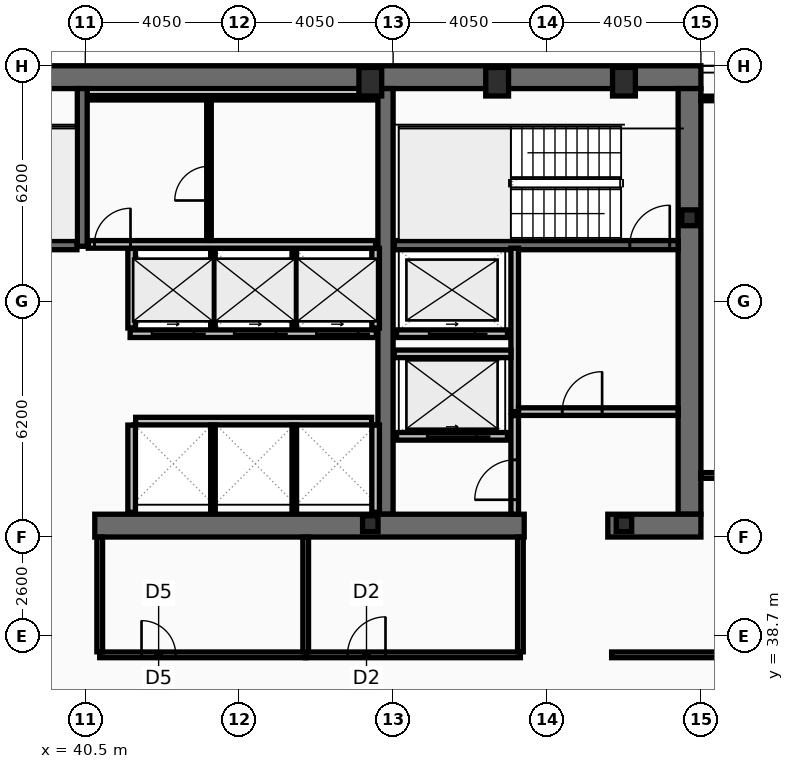
"""IFC4 building model, lengths in metres.
Left out: names, types, materials, properties, quantities, classifications, styles, units other than length and angle.
Written with IfcOpenShell. Run it as: python <this file> out.ifc"""

import sys

from ifc_helpers import new_model, si_unit, direction, frame, frame_2d, origin, origin_2d, place, context, subcontext, project, spatial, rectangle, hollow_rectangle, i_section, extrude, element, fill, save


model = new_model("IFC4")
c1 = context("Model", 3, precision=1e-05, world=origin(), true_north=direction((0.0, 1.0)))
c2 = subcontext(c1, "Body", "Model", "MODEL_VIEW")
j1 = project(units=[si_unit("LENGTHUNIT", "METRE"), si_unit("PLANEANGLEUNIT", "RADIAN")], contexts=[c1])
p1 = place(None, origin())
s1 = spatial("IfcSite", under=j1, at=p1, CompositionType="ELEMENT")
p2 = place(p1, origin())
s2 = spatial("IfcBuilding", under=s1, at=p2, CompositionType="ELEMENT")
p3 = place(p2, frame((0.0, 0.0, 246.2)))
s3 = spatial("IfcBuildingStorey", under=s2, at=p3, CompositionType="ELEMENT", Elevation=246.2)
p4 = place(p3, frame((16.2, 53.4, 0.0), z_axis=(0.0, 0.0, 1.0), x_axis=(1.0, 0.0, 0.0)))
e1 = element("IfcWall", 1, at=p4, inside=s3, PredefinedType="SHEAR", context=c2, shape_type="SweptSolid", body=[
    extrude(rectangle(XDim=40.5, YDim=0.6, at=frame_2d((20.25, 0.0))), origin(), (0.0, 0.0, 1.0), 3.44),
])
p5 = place(p3, frame((56.4, 53.1, 0.0), z_axis=(0.0, 0.0, 1.0), x_axis=(0.0, -1.0, 0.0)))
e2 = element("IfcWall", 2, at=p5, inside=s3, PredefinedType="SHEAR", context=c2, shape_type="SweptSolid", body=[
    extrude(rectangle(XDim=11.2, YDim=0.6, at=frame_2d((5.6, 0.0))), origin(), (0.0, 0.0, 1.0), 3.44),
])
p6 = place(p3, frame((48.4, 41.9, 0.0), z_axis=(0.0, 0.0, 1.0), x_axis=(0.0, 1.0, 0.0)))
e3 = element("IfcWall", 3, at=p6, inside=s3, PredefinedType="SHEAR", context=c2, shape_type="SweptSolid", body=[
    extrude(rectangle(XDim=11.2, YDim=0.4, at=frame_2d((5.6, 0.0))), origin(), (0.0, 0.0, 1.0), 3.44),
])
p7 = place(p3, frame((52.05, 41.6, 0.0), z_axis=(0.0, 0.0, 1.0), x_axis=(-1.0, 0.0, 0.0)))
e4 = element("IfcWall", 4, at=p7, inside=s3, PredefinedType="SHEAR", context=c2, shape_type="SweptSolid", body=[
    extrude(rectangle(XDim=11.3, YDim=0.6, at=frame_2d((5.65, 0.0))), origin(), (0.0, 0.0, 1.0), 3.44),
])
p8 = place(p3, frame((56.7, 41.6, 0.0), z_axis=(0.0, 0.0, 1.0), x_axis=(-1.0, 0.0, 0.0)))
e5 = element("IfcWall", 5, at=p8, inside=s3, PredefinedType="SHEAR", context=c2, shape_type="SweptSolid", body=[
    extrude(rectangle(XDim=2.45, YDim=0.6, at=frame_2d((1.225, 0.0))), origin(), (0.0, 0.0, 1.0), 3.44),
])
p9 = place(p3, frame((40.42, 48.95, 0.0), z_axis=(0.0, 0.0, 1.0), x_axis=(0.0, 1.0, 0.0)))
e6 = element("IfcWall", 6, at=p9, inside=s3, PredefinedType="SHEAR", context=c2, shape_type="SweptSolid", body=[
    extrude(rectangle(XDim=4.15, YDim=0.26, at=frame_2d((2.075, 0.0))), origin(), (0.0, 0.0, 1.0), 3.44),
])
p10 = place(p3, frame((48.63, 48.98, 0.0), z_axis=(0.0, 0.0, 1.0), x_axis=(1.0, 0.0, 0.0)))
e7 = element("IfcWall", 7, at=p10, inside=s3, PredefinedType="SHEAR", context=c2, shape_type="SweptSolid", body=[
    extrude(rectangle(XDim=7.47, YDim=0.24, at=frame_2d((3.735, 0.0))), origin(), (0.0, 0.0, 1.0), 3.44),
])
p11 = place(p10, frame((6.2, 0.0, 0.0)))
e8 = element("IfcOpeningElement", 8, at=p11, cuts=e7, PredefinedType="OPENING", context=c2, shape_type="SweptSolid", body=[
    extrude(rectangle(XDim=1.05, YDim=2.15, at=frame_2d((0.525, 1.075))), frame((0.0, 0.13, 0.0), z_axis=(0.0, -1.0, 0.0), x_axis=(1.0, 0.0, 0.0)), (0.0, 0.0, 1.0), 0.26),
])
p12 = place(p3, frame((32.72, 48.98, 0.0), z_axis=(0.0, 0.0, 1.0), x_axis=(1.0, 0.0, 0.0)))
e9 = element("IfcWall", 9, at=p12, inside=s3, PredefinedType="SHEAR", context=c2, shape_type="SweptSolid", body=[
    extrude(rectangle(XDim=7.56, YDim=0.24, at=frame_2d((3.78, 0.0))), origin(), (0.0, 0.0, 1.0), 3.44),
])
p13 = place(p12, frame((0.22, 0.0, 0.0)))
e10 = element("IfcOpeningElement", 10, at=p13, cuts=e9, PredefinedType="OPENING", context=c2, shape_type="SweptSolid", body=[
    extrude(rectangle(XDim=1.05, YDim=2.15, at=frame_2d((0.525, 1.075))), frame((0.0, 0.13, 0.0), z_axis=(0.0, -1.0, 0.0), x_axis=(1.0, 0.0, 0.0)), (0.0, 0.0, 1.0), 0.26),
])
for number, where, z_axis, x_axis in (
    (11, (48.0, 53.28, 0.0), (0.0, 0.0, 1.0), (1.0, 0.0, 0.0)),
    (12, (51.337, 53.28, 0.0), (0.0, 0.0, 1.0), (1.0, 0.0, 0.0)),
    (13, (54.675, 53.28, 0.0), (0.0, 0.0, 1.0), (1.0, 0.0, 0.0)),
):
    element("IfcColumn", number, at=place(p3, frame(where, z_axis=z_axis, x_axis=x_axis)), inside=s3, PredefinedType="COLUMN", context=c2, shape_type="SweptSolid", body=[
        extrude(hollow_rectangle(XDim=0.6, YDim=0.75, WallThickness=0.045, at=origin_2d()), origin(), (0.0, 0.0, 1.0), 3.6),
    ])
for number, where, z_axis, x_axis in (
    (14, (56.4, 49.7, 0.0), (0.0, 0.0, 1.0), (1.0, 0.0, 0.0)),
    (15, (48.0, 41.65, 0.0), (0.0, 0.0, 1.0), (1.0, 0.0, 0.0)),
    (16, (54.675, 41.65, 0.0), (0.0, 0.0, 1.0), (1.0, 0.0, 0.0)),
):
    element("IfcColumn", number, at=place(p3, frame(where, z_axis=z_axis, x_axis=x_axis)), inside=s3, PredefinedType="COLUMN", context=c2, shape_type="SweptSolid", body=[
        extrude(i_section(OverallWidth=0.406, OverallDepth=0.416, WebThickness=0.03, FlangeThickness=0.048, at=origin_2d()), origin(), (0.0, 0.0, 1.0), 3.6),
    ])
p14 = place(p3, frame((51.61, 43.95, 0.0), z_axis=(0.0, 0.0, 1.0), x_axis=(-1.0, 0.0, 0.0)))
e17 = element("IfcWall", 17, at=p14, inside=s3, PredefinedType="PARTITIONING", context=c2, shape_type="SweptSolid", body=[
    extrude(rectangle(XDim=2.92, YDim=0.2, at=frame_2d((1.46, 0.0))), origin(), (0.0, 0.0, 1.0), 3.44),
])
p15 = place(p14, frame((0.81, 0.0, 0.0)))
e18 = element("IfcOpeningElement", 18, at=p15, cuts=e17, PredefinedType="OPENING", context=c2, shape_type="SweptSolid", body=[
    extrude(rectangle(XDim=1.3, YDim=2.18, at=frame_2d((0.65, 1.09))), frame((0.0, 0.11, 0.0), z_axis=(0.0, -1.0, 0.0), x_axis=(1.0, 0.0, 0.0)), (0.0, 0.0, 1.0), 0.22),
])
p16 = place(p3, frame((51.61, 46.65, 0.0), z_axis=(0.0, 0.0, 1.0), x_axis=(-1.0, 0.0, 0.0)))
e19 = element("IfcWall", 19, at=p16, inside=s3, PredefinedType="PARTITIONING", context=c2, shape_type="SweptSolid", body=[
    extrude(rectangle(XDim=2.92, YDim=0.2, at=frame_2d((1.46, 0.0))), origin(), (0.0, 0.0, 1.0), 3.44),
])
p17 = place(p16, frame((0.86, 0.0, 0.0)))
e20 = element("IfcOpeningElement", 20, at=p17, cuts=e19, PredefinedType="OPENING", context=c2, shape_type="SweptSolid", body=[
    extrude(rectangle(XDim=1.2, YDim=2.18, at=frame_2d((0.6, 1.09))), frame((0.0, 0.11, 0.0), z_axis=(0.0, -1.0, 0.0), x_axis=(1.0, 0.0, 0.0)), (0.0, 0.0, 1.0), 0.22),
])
p18 = place(p3, frame((48.16, 46.65, 0.0), z_axis=(0.0, 0.0, 1.0), x_axis=(-1.0, 0.0, 0.0)))
e21 = element("IfcWall", 21, at=p18, inside=s3, PredefinedType="PARTITIONING", context=c2, shape_type="SweptSolid", body=[
    extrude(rectangle(XDim=6.48, YDim=0.2, at=frame_2d((3.24, 0.0))), origin(), (0.0, 0.0, 1.0), 3.44),
])
p19 = place(p18, frame((4.8, 0.0, 0.0)))
e22 = element("IfcOpeningElement", 22, at=p19, cuts=e21, PredefinedType="OPENING", context=c2, shape_type="SweptSolid", body=[
    extrude(rectangle(XDim=1.1, YDim=2.18, at=frame_2d((0.55, 1.09))), frame((0.0, 0.11, 0.0), z_axis=(0.0, -1.0, 0.0), x_axis=(1.0, 0.0, 0.0)), (0.0, 0.0, 1.0), 0.22),
])
p20 = place(p18, frame((2.64, 0.0, 0.0)))
e23 = element("IfcOpeningElement", 23, at=p20, cuts=e21, PredefinedType="OPENING", context=c2, shape_type="SweptSolid", body=[
    extrude(rectangle(XDim=1.1, YDim=2.18, at=frame_2d((0.55, 1.09))), frame((0.0, 0.11, 0.0), z_axis=(0.0, -1.0, 0.0), x_axis=(1.0, 0.0, 0.0)), (0.0, 0.0, 1.0), 0.22),
])
p21 = place(p18, frame((0.48, 0.0, 0.0)))
e24 = element("IfcOpeningElement", 24, at=p21, cuts=e21, PredefinedType="OPENING", context=c2, shape_type="SweptSolid", body=[
    extrude(rectangle(XDim=1.1, YDim=2.18, at=frame_2d((0.55, 1.09))), frame((0.0, 0.11, 0.0), z_axis=(0.0, -1.0, 0.0), x_axis=(1.0, 0.0, 0.0)), (0.0, 0.0, 1.0), 0.22),
])
p22 = place(p3, frame((51.8, 44.6, 0.0), z_axis=(0.0, 0.0, 1.0), x_axis=(0.0, 1.0, 0.0)))
e25 = element("IfcWall", 25, at=p22, inside=s3, PredefinedType="PARTITIONING", context=c2, shape_type="SweptSolid", body=[
    extrude(rectangle(XDim=4.3, YDim=0.2, at=frame_2d((2.15, 0.0))), origin(), (0.0, 0.0, 1.0), 3.44),
])
p23 = place(p3, frame((51.9, 44.6, 0.0), z_axis=(0.0, 0.0, 1.0), x_axis=(1.0, 0.0, 0.0)))
e26 = element("IfcWall", 26, at=p23, inside=s3, PredefinedType="PARTITIONING", context=c2, shape_type="SweptSolid", body=[
    extrude(rectangle(XDim=4.2, YDim=0.2, at=frame_2d((2.1, 0.0))), origin(), (0.0, 0.0, 1.0), 3.44),
])
p24 = place(p23, frame((1.15, 0.0, 0.0)))
e27 = element("IfcOpeningElement", 27, at=p24, cuts=e26, PredefinedType="OPENING", context=c2, shape_type="SweptSolid", body=[
    extrude(rectangle(XDim=1.05, YDim=2.15, at=frame_2d((0.525, 1.075))), frame((0.0, 0.11, 0.0), z_axis=(0.0, -1.0, 0.0), x_axis=(1.0, 0.0, 0.0)), (0.0, 0.0, 1.0), 0.22),
])
p25 = place(p3, frame((48.63, 46.12, 0.0), z_axis=(0.0, 0.0, 1.0), x_axis=(1.0, 0.0, 0.0)))
e28 = element("IfcWall", 28, at=p25, inside=s3, PredefinedType="PARTITIONING", context=c2, shape_type="SweptSolid", body=[
    extrude(rectangle(XDim=3.07, YDim=0.2, at=frame_2d((1.535, 0.0))), origin(), (0.0, 0.0, 1.0), 3.44),
])
p26 = place(p3, frame((51.8, 41.9, 0.0), z_axis=(0.0, 0.0, 1.0), x_axis=(0.0, 1.0, 0.0)))
e29 = element("IfcWall", 29, at=p26, inside=s3, PredefinedType="PARTITIONING", context=c2, shape_type="SweptSolid", body=[
    extrude(rectangle(XDim=2.595, YDim=0.2, at=frame_2d((1.298, 0.0))), origin(), (0.0, 0.0, 1.0), 3.44),
])
p27 = place(p26, frame((0.38, 0.0, 0.0)))
e30 = element("IfcOpeningElement", 30, at=p27, cuts=e29, PredefinedType="OPENING", context=c2, shape_type="SweptSolid", body=[
    extrude(rectangle(XDim=1.05, YDim=2.15, at=frame_2d((0.525, 1.075))), frame((0.0, 0.11, 0.0), z_axis=(0.0, -1.0, 0.0), x_axis=(1.0, 0.0, 0.0)), (0.0, 0.0, 1.0), 0.22),
])
for number, where, z_axis, x_axis in (
    (31, (41.72, 46.8, 0.0), (0.0, 0.0, 1.0), (0.0, 1.0, 0.0)),
    (32, (48.14, 46.8, 0.0), (0.0, 0.0, 1.0), (0.0, 1.0, 0.0)),
):
    element("IfcWall", number, at=place(p3, frame(where, z_axis=z_axis, x_axis=x_axis)), inside=s3, PredefinedType="PARTITIONING", context=c2, shape_type="SweptSolid", body=[
        extrude(rectangle(XDim=2.095, YDim=0.2, at=frame_2d((1.047, 0.0))), origin(), (0.0, 0.0, 1.0), 3.44),
    ])
for number, where, z_axis, x_axis in (
    (33, (43.86, 46.8, 0.0), (0.0, 0.0, 1.0), (0.0, 1.0, 0.0)),
    (34, (46.0, 46.8, 0.0), (0.0, 0.0, 1.0), (0.0, 1.0, 0.0)),
):
    element("IfcWall", number, at=place(p3, frame(where, z_axis=z_axis, x_axis=x_axis)), inside=s3, PredefinedType="PARTITIONING", context=c2, shape_type="SweptSolid", body=[
        extrude(rectangle(XDim=2.095, YDim=0.12, at=frame_2d((1.047, 0.0))), origin(), (0.0, 0.0, 1.0), 3.44),
    ])
p28 = place(p3, frame((41.825, 44.35, 0.0), z_axis=(0.0, 0.0, 1.0), x_axis=(1.0, 0.0, 0.0)))
e35 = element("IfcWall", 35, at=p28, inside=s3, PredefinedType="PARTITIONING", context=c2, shape_type="SweptSolid", body=[
    extrude(rectangle(XDim=6.21, YDim=0.2, at=frame_2d((3.105, 0.0))), origin(), (0.0, 0.0, 1.0), 3.44),
])
for number, where, z_axis, x_axis in (
    (36, (41.72, 41.95, 0.0), (0.0, 0.0, 1.0), (0.0, 1.0, 0.0)),
    (37, (48.14, 41.95, 0.0), (0.0, 0.0, 1.0), (0.0, 1.0, 0.0)),
):
    element("IfcWall", number, at=place(p3, frame(where, z_axis=z_axis, x_axis=x_axis)), inside=s3, PredefinedType="PARTITIONING", context=c2, shape_type="SweptSolid", body=[
        extrude(rectangle(XDim=2.295, YDim=0.2, at=frame_2d((1.147, 0.0))), origin(), (0.0, 0.0, 1.0), 3.44),
    ])
for number, where, z_axis, x_axis in (
    (38, (43.86, 41.95, 0.0), (0.0, 0.0, 1.0), (0.0, 1.0, 0.0)),
    (39, (46.0, 41.95, 0.0), (0.0, 0.0, 1.0), (0.0, 1.0, 0.0)),
):
    element("IfcWall", number, at=place(p3, frame(where, z_axis=z_axis, x_axis=x_axis)), inside=s3, PredefinedType="PARTITIONING", context=c2, shape_type="SweptSolid", body=[
        extrude(rectangle(XDim=2.295, YDim=0.12, at=frame_2d((1.147, 0.0))), origin(), (0.0, 0.0, 1.0), 3.44),
    ])
p29 = place(p3, frame((40.58, 52.86, 0.0), z_axis=(0.0, 0.0, 1.0), x_axis=(1.0, 0.0, 0.0)))
e40 = element("IfcWall", 40, at=p29, inside=s3, PredefinedType="PARTITIONING", context=c2, shape_type="SweptSolid", body=[
    extrude(rectangle(XDim=7.56, YDim=0.12, at=frame_2d((3.78, 0.0))), origin(), (0.0, 0.0, 1.0), 3.44),
])
p30 = place(p3, frame((40.58, 49.0, 0.0), z_axis=(0.0, 0.0, 1.0), x_axis=(1.0, 0.0, 0.0)))
e41 = element("IfcWall", 41, at=p30, inside=s3, PredefinedType="PARTITIONING", context=c2, shape_type="SweptSolid", body=[
    extrude(rectangle(XDim=7.56, YDim=0.2, at=frame_2d((3.78, 0.0))), origin(), (0.0, 0.0, 1.0), 3.44),
])
p31 = place(p30, frame((0.16, 0.0, 0.0)))
e42 = element("IfcOpeningElement", 42, at=p31, cuts=e41, PredefinedType="OPENING", context=c2, shape_type="SweptSolid", body=[
    extrude(rectangle(XDim=0.95, YDim=2.1, at=frame_2d((0.475, 1.05))), frame((0.0, 0.11, 0.0), z_axis=(0.0, -1.0, 0.0), x_axis=(1.0, 0.0, 0.0)), (0.0, 0.0, 1.0), 0.22),
])
p32 = place(p3, frame((43.755, 49.105, 0.0), z_axis=(0.0, 0.0, 1.0), x_axis=(0.0, 1.0, 0.0)))
e43 = element("IfcWall", 43, at=p32, inside=s3, PredefinedType="PARTITIONING", context=c2, shape_type="SweptSolid", body=[
    extrude(rectangle(XDim=3.69, YDim=0.12, at=frame_2d((1.845, 0.0))), origin(), (0.0, 0.0, 1.0), 3.44),
])
p33 = place(p32, frame((1.05, 0.0, 0.0)))
e44 = element("IfcOpeningElement", 44, at=p33, cuts=e43, PredefinedType="OPENING", context=c2, shape_type="SweptSolid", body=[
    extrude(rectangle(XDim=0.9, YDim=2.05, at=frame_2d((0.45, 1.025))), frame((0.0, 0.07, 0.0), z_axis=(0.0, -1.0, 0.0), x_axis=(1.0, 0.0, 0.0)), (0.0, 0.0, 1.0), 0.14),
])
p34 = place(p3, frame((40.88, 38.2, 0.0), z_axis=(0.0, 0.0, 1.0), x_axis=(1.0, 0.0, 0.0)))
e45 = element("IfcWall", 45, at=p34, inside=s3, PredefinedType="PARTITIONING", context=c2, shape_type="SweptSolid", body=[
    extrude(rectangle(XDim=5.42, YDim=0.15, at=frame_2d((2.71, 0.0))), origin(), (0.0, 0.0, 1.0), 2.78),
])
p35 = place(p34, frame((1.1, 0.0, 0.0)))
e46 = element("IfcOpeningElement", 46, at=p35, cuts=e45, PredefinedType="OPENING", context=c2, shape_type="SweptSolid", body=[
    extrude(rectangle(XDim=0.9, YDim=2.05, at=frame_2d((0.45, 1.025))), frame((0.0, 0.085, 0.0), z_axis=(0.0, -1.0, 0.0), x_axis=(1.0, 0.0, 0.0)), (0.0, 0.0, 1.0), 0.17),
])
p36 = place(p3, frame((46.3, 38.2, 0.0), z_axis=(0.0, 0.0, 1.0), x_axis=(1.0, 0.0, 0.0)))
e47 = element("IfcWall", 47, at=p36, inside=s3, PredefinedType="PARTITIONING", context=c2, shape_type="SweptSolid", body=[
    extrude(rectangle(XDim=5.65, YDim=0.15, at=frame_2d((2.825, 0.0))), origin(), (0.0, 0.0, 1.0), 2.78),
])
p37 = place(p36, frame((1.1, 0.0, 0.0)))
e48 = element("IfcOpeningElement", 48, at=p37, cuts=e47, PredefinedType="OPENING", context=c2, shape_type="SweptSolid", body=[
    extrude(rectangle(XDim=1.0, YDim=2.05, at=frame_2d((0.5, 1.025))), frame((0.0, 0.085, 0.0), z_axis=(0.0, -1.0, 0.0), x_axis=(1.0, 0.0, 0.0)), (0.0, 0.0, 1.0), 0.17),
])
for number, where, z_axis, x_axis in (
    (49, (40.88, 38.28, 0.0), (0.0, 0.0, 1.0), (0.0, 1.0, 0.0)),
    (50, (46.3, 38.28, 0.0), (0.0, 0.0, 1.0), (0.0, 1.0, 0.0)),
    (51, (51.95, 38.28, 0.0), (0.0, 0.0, 1.0), (0.0, 1.0, 0.0)),
):
    element("IfcWall", number, at=place(p3, frame(where, z_axis=z_axis, x_axis=x_axis)), inside=s3, PredefinedType="PARTITIONING", context=c2, shape_type="SweptSolid", body=[
        extrude(rectangle(XDim=3.02, YDim=0.15, at=frame_2d((1.51, 0.0))), origin(), (0.0, 0.0, 1.0), 3.44),
    ])
p38 = place(p3, frame((54.35, 38.2, 0.0), z_axis=(0.0, 0.0, 1.0), x_axis=(1.0, 0.0, 0.0)))
e52 = element("IfcWall", 52, at=p38, inside=s3, PredefinedType="PARTITIONING", context=c2, shape_type="SweptSolid", body=[
    extrude(rectangle(XDim=8.52, YDim=0.15, at=frame_2d((4.26, 0.0))), origin(), (0.0, 0.0, 1.0), 2.78),
])
p39 = place(p38, frame((3.25, 0.0, 0.0)))
e53 = element("IfcOpeningElement", 53, at=p39, cuts=e52, PredefinedType="OPENING", context=c2, shape_type="SweptSolid", body=[
    extrude(rectangle(XDim=0.95, YDim=2.05, at=frame_2d((0.475, 1.025))), frame((0.0, 0.085, 0.0), z_axis=(0.0, -1.0, 0.0), x_axis=(1.0, 0.0, 0.0)), (0.0, 0.0, 1.0), 0.17),
])
p40 = place(p3, frame((56.7, 42.92, 0.0), z_axis=(0.0, 0.0, 1.0), x_axis=(1.0, 0.0, 0.0)))
e54 = element("IfcWall", 54, at=p40, inside=s3, PredefinedType="PARTITIONING", context=c2, shape_type="SweptSolid", body=[
    extrude(rectangle(XDim=6.105, YDim=0.15, at=frame_2d((3.052, 0.0))), origin(), (0.0, 0.0, 1.0), 2.78),
])
p41 = place(p40, frame((0.9, 0.0, 0.0)))
e55 = element("IfcOpeningElement", 55, at=p41, cuts=e54, PredefinedType="OPENING", context=c2, shape_type="SweptSolid", body=[
    extrude(rectangle(XDim=0.9, YDim=2.05, at=frame_2d((0.45, 1.025))), frame((0.0, 0.085, 0.0), z_axis=(0.0, -1.0, 0.0), x_axis=(1.0, 0.0, 0.0)), (0.0, 0.0, 1.0), 0.17),
])
p42 = place(p3, frame((56.7, 52.84, 0.0), z_axis=(0.0, 0.0, 1.0), x_axis=(1.0, 0.0, 0.0)))
e56 = element("IfcWall", 56, at=p42, inside=s3, PredefinedType="PARTITIONING", context=c2, shape_type="SweptSolid", body=[
    extrude(rectangle(XDim=6.105, YDim=0.12, at=frame_2d((3.052, 0.0))), origin(), (0.0, 0.0, 1.0), 3.44),
])
p43 = place(p11, origin())
e57 = element("IfcDoor", 57, at=p43, inside=s3, OperationType="SINGLE_SWING_RIGHT", PredefinedType="DOOR", context=c2, shape_type="SweptSolid", body=[
    extrude(rectangle(XDim=1.05, YDim=2.15, at=frame_2d((0.525, 1.075))), frame((0.0, 0.025, 0.0), z_axis=(0.0, -1.0, 0.0), x_axis=(1.0, 0.0, 0.0)), (0.0, 0.0, 1.0), 0.05),
])
fill(e8, e57)
p44 = place(p15, origin())
e58 = element("IfcDoor", 58, at=p44, inside=s3, OperationType="SLIDING_TO_LEFT", PredefinedType="DOOR", context=c2, shape_type="SweptSolid", body=[
    extrude(rectangle(XDim=1.3, YDim=2.18, at=frame_2d((0.65, 1.09))), frame((0.0, 0.025, 0.0), z_axis=(0.0, -1.0, 0.0), x_axis=(1.0, 0.0, 0.0)), (0.0, 0.0, 1.0), 0.05),
])
fill(e18, e58)
p45 = place(p17, origin())
e59 = element("IfcDoor", 59, at=p45, inside=s3, OperationType="SLIDING_TO_LEFT", PredefinedType="DOOR", context=c2, shape_type="SweptSolid", body=[
    extrude(rectangle(XDim=1.2, YDim=2.18, at=frame_2d((0.6, 1.09))), frame((0.0, 0.025, 0.0), z_axis=(0.0, -1.0, 0.0), x_axis=(1.0, 0.0, 0.0)), (0.0, 0.0, 1.0), 0.05),
])
fill(e20, e59)
p46 = place(p19, origin())
e60 = element("IfcDoor", 60, at=p46, inside=s3, OperationType="SLIDING_TO_LEFT", PredefinedType="DOOR", context=c2, shape_type="SweptSolid", body=[
    extrude(rectangle(XDim=1.1, YDim=2.18, at=frame_2d((0.55, 1.09))), frame((0.0, 0.025, 0.0), z_axis=(0.0, -1.0, 0.0), x_axis=(1.0, 0.0, 0.0)), (0.0, 0.0, 1.0), 0.05),
])
fill(e22, e60)
p47 = place(p20, origin())
e61 = element("IfcDoor", 61, at=p47, inside=s3, OperationType="SLIDING_TO_LEFT", PredefinedType="DOOR", context=c2, shape_type="SweptSolid", body=[
    extrude(rectangle(XDim=1.1, YDim=2.18, at=frame_2d((0.55, 1.09))), frame((0.0, 0.025, 0.0), z_axis=(0.0, -1.0, 0.0), x_axis=(1.0, 0.0, 0.0)), (0.0, 0.0, 1.0), 0.05),
])
fill(e23, e61)
p48 = place(p21, origin())
e62 = element("IfcDoor", 62, at=p48, inside=s3, OperationType="SLIDING_TO_LEFT", PredefinedType="DOOR", context=c2, shape_type="SweptSolid", body=[
    extrude(rectangle(XDim=1.1, YDim=2.18, at=frame_2d((0.55, 1.09))), frame((0.0, 0.025, 0.0), z_axis=(0.0, -1.0, 0.0), x_axis=(1.0, 0.0, 0.0)), (0.0, 0.0, 1.0), 0.05),
])
fill(e24, e62)
p49 = place(p24, origin())
e63 = element("IfcDoor", 63, at=p49, inside=s3, OperationType="SINGLE_SWING_RIGHT", PredefinedType="DOOR", context=c2, shape_type="SweptSolid", body=[
    extrude(rectangle(XDim=1.05, YDim=2.15, at=frame_2d((0.525, 1.075))), frame((0.0, 0.025, 0.0), z_axis=(0.0, -1.0, 0.0), x_axis=(1.0, 0.0, 0.0)), (0.0, 0.0, 1.0), 0.05),
])
fill(e27, e63)
p50 = place(p27, origin())
e64 = element("IfcDoor", 64, at=p50, inside=s3, OperationType="SINGLE_SWING_LEFT", PredefinedType="DOOR", context=c2, shape_type="SweptSolid", body=[
    extrude(rectangle(XDim=1.05, YDim=2.15, at=frame_2d((0.525, 1.075))), frame((0.0, 0.025, 0.0), z_axis=(0.0, -1.0, 0.0), x_axis=(1.0, 0.0, 0.0)), (0.0, 0.0, 1.0), 0.05),
])
fill(e30, e64)
p51 = place(p31, origin())
e65 = element("IfcDoor", 65, at=p51, inside=s3, OperationType="SINGLE_SWING_RIGHT", PredefinedType="DOOR", context=c2, shape_type="SweptSolid", body=[
    extrude(rectangle(XDim=0.95, YDim=2.1, at=frame_2d((0.475, 1.05))), frame((0.0, 0.025, 0.0), z_axis=(0.0, -1.0, 0.0), x_axis=(1.0, 0.0, 0.0)), (0.0, 0.0, 1.0), 0.05),
])
fill(e42, e65)
p52 = place(p33, origin())
e66 = element("IfcDoor", 66, at=p52, inside=s3, OperationType="SINGLE_SWING_LEFT", PredefinedType="DOOR", context=c2, shape_type="SweptSolid", body=[
    extrude(rectangle(XDim=0.9, YDim=2.05, at=frame_2d((0.45, 1.025))), frame((0.0, 0.025, 0.0), z_axis=(0.0, -1.0, 0.0), x_axis=(1.0, 0.0, 0.0)), (0.0, 0.0, 1.0), 0.05),
])
fill(e44, e66)
p53 = place(p35, origin())
e67 = element("IfcDoor", 67, at=p53, inside=s3, OperationType="SINGLE_SWING_LEFT", PredefinedType="DOOR", context=c2, shape_type="SweptSolid", body=[
    extrude(rectangle(XDim=0.9, YDim=2.05, at=frame_2d((0.45, 1.025))), frame((0.0, 0.025, 0.0), z_axis=(0.0, -1.0, 0.0), x_axis=(1.0, 0.0, 0.0)), (0.0, 0.0, 1.0), 0.05),
])
fill(e46, e67)
p54 = place(p37, origin())
e68 = element("IfcDoor", 68, at=p54, inside=s3, OperationType="SINGLE_SWING_RIGHT", PredefinedType="DOOR", context=c2, shape_type="SweptSolid", body=[
    extrude(rectangle(XDim=1.0, YDim=2.05, at=frame_2d((0.5, 1.025))), frame((0.0, 0.025, 0.0), z_axis=(0.0, -1.0, 0.0), x_axis=(1.0, 0.0, 0.0)), (0.0, 0.0, 1.0), 0.05),
])
fill(e48, e68)
save(model, sys.argv[1])
